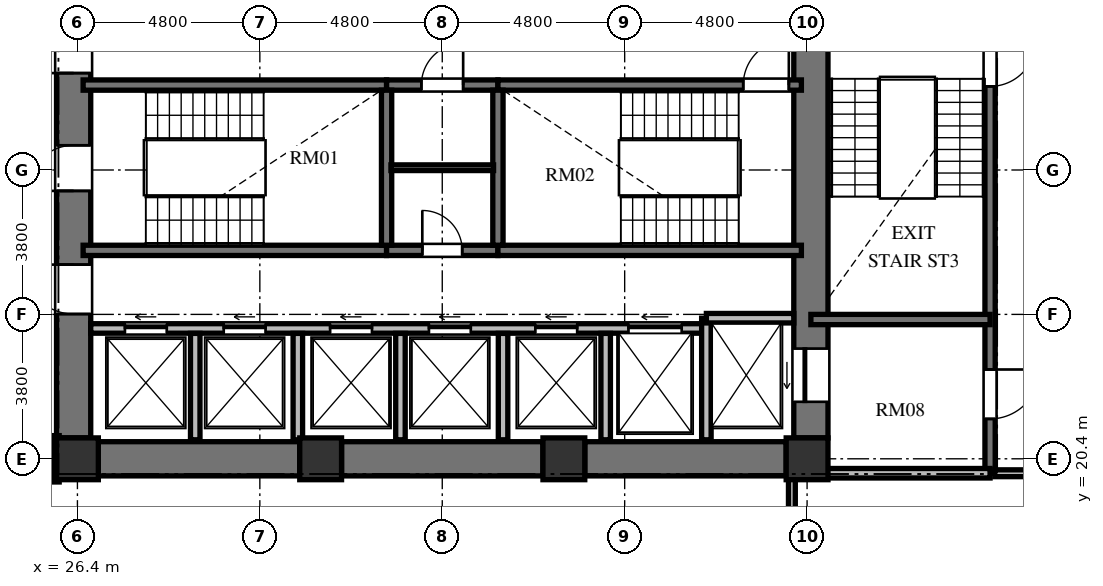
"""IFC4 building model, lengths in metres.
Left out: names, types, materials, properties, quantities, classifications, styles, units other than length and angle.
Written with IfcOpenShell. Run it as: python <this file> out.ifc"""

import sys

from ifc_helpers import new_model, si_unit, direction, frame, frame_2d, origin, origin_2d, place, context, subcontext, project, spatial, rectangle, extrude, element, fill, save


model = new_model("IFC4")
c1 = context("Model", 3, precision=1e-05, world=origin(), true_north=direction((0.0, 1.0)))
c2 = subcontext(c1, "Body", "Model", "MODEL_VIEW")
j1 = project(units=[si_unit("LENGTHUNIT", "METRE"), si_unit("PLANEANGLEUNIT", "RADIAN")], contexts=[c1])
p1 = place(None, origin())
s1 = spatial("IfcSite", under=j1, at=p1, CompositionType="ELEMENT")
p2 = place(p1, origin())
s2 = spatial("IfcBuilding", under=s1, at=p2, CompositionType="ELEMENT")
p3 = place(p2, frame((0.0, 0.0, 54.384)))
s3 = spatial("IfcBuildingStorey", under=s2, at=p3, CompositionType="ELEMENT", Elevation=54.384)
for number, where, z_axis, x_axis in (
    (1, (26.4, 20.4, 0.0), (0.0, 0.0, 1.0), (1.0, 0.0, 0.0)),
    (2, (32.8, 20.4, 0.0), (0.0, 0.0, 1.0), (1.0, 0.0, 0.0)),
    (3, (39.2, 20.4, 0.0), (0.0, 0.0, 1.0), (1.0, 0.0, 0.0)),
    (4, (45.6, 20.4, 0.0), (0.0, 0.0, 1.0), (1.0, 0.0, 0.0)),
):
    element("IfcColumn", number, at=place(p3, frame(where, z_axis=z_axis, x_axis=x_axis)), inside=s3, PredefinedType="COLUMN", context=c2, shape_type="SweptSolid", body=[
        extrude(rectangle(XDim=1.1, YDim=1.1, at=origin_2d()), origin(), (0.0, 0.0, 1.0), 3.648),
    ])
p4 = place(p3, frame((26.3, 20.95, 0.0), z_axis=(0.0, 0.0, 1.0), x_axis=(0.0, 1.0, 0.0)))
e5 = element("IfcWall", 5, at=p4, inside=s3, PredefinedType="SHEAR", context=c2, shape_type="SweptSolid", body=[
    extrude(rectangle(XDim=14.1, YDim=0.9, at=frame_2d((7.05, 0.0))), origin(), (0.0, 0.0, 1.0), 3.648),
])
p5 = place(p4, frame((6.5, 0.0, 0.0)))
e6 = element("IfcOpeningElement", 6, at=p5, cuts=e5, PredefinedType="OPENING", context=c2, shape_type="SweptSolid", body=[
    extrude(rectangle(XDim=1.2, YDim=2.15, at=frame_2d((0.6, 1.075))), frame((0.0, 0.46, 0.0), z_axis=(0.0, -1.0, 0.0), x_axis=(1.0, 0.0, 0.0)), (0.0, 0.0, 1.0), 0.92),
])
p6 = place(p4, frame((9.6, 0.0, 0.0)))
e7 = element("IfcOpeningElement", 7, at=p6, cuts=e5, PredefinedType="OPENING", context=c2, shape_type="SweptSolid", body=[
    extrude(rectangle(XDim=1.3, YDim=2.2, at=frame_2d((0.65, 1.1))), frame((0.0, 0.46, 0.0), z_axis=(0.0, -1.0, 0.0), x_axis=(1.0, 0.0, 0.0)), (0.0, 0.0, 1.0), 0.92),
])
p7 = place(p4, frame((3.26, 0.0, 0.0)))
e8 = element("IfcOpeningElement", 8, at=p7, cuts=e5, PredefinedType="OPENING", context=c2, shape_type="SweptSolid", body=[
    extrude(rectangle(XDim=1.3, YDim=2.2, at=frame_2d((0.65, 1.1))), frame((0.0, 0.46, 0.0), z_axis=(0.0, -1.0, 0.0), x_axis=(1.0, 0.0, 0.0)), (0.0, 0.0, 1.0), 0.92),
])
p8 = place(p3, frame((45.7, 20.95, 0.0), z_axis=(0.0, 0.0, 1.0), x_axis=(0.0, 1.0, 0.0)))
e9 = element("IfcWall", 9, at=p8, inside=s3, PredefinedType="SHEAR", context=c2, shape_type="SweptSolid", body=[
    extrude(rectangle(XDim=14.1, YDim=0.9, at=frame_2d((7.05, 0.0))), origin(), (0.0, 0.0, 1.0), 3.648),
])
p9 = place(p8, frame((11.75, 0.0, 0.0)))
e10 = element("IfcOpeningElement", 10, at=p9, cuts=e9, PredefinedType="OPENING", context=c2, shape_type="SweptSolid", body=[
    extrude(rectangle(XDim=1.4, YDim=2.3, at=frame_2d((0.7, 1.15))), frame((0.0, 0.46, 0.0), z_axis=(0.0, -1.0, 0.0), x_axis=(1.0, 0.0, 0.0)), (0.0, 0.0, 1.0), 0.92),
])
p10 = place(p8, frame((0.95, 0.0, 0.0)))
e11 = element("IfcOpeningElement", 11, at=p10, cuts=e9, PredefinedType="OPENING", context=c2, shape_type="SweptSolid", body=[
    extrude(rectangle(XDim=1.4, YDim=2.3, at=frame_2d((0.7, 1.15))), frame((0.0, 0.46, 0.0), z_axis=(0.0, -1.0, 0.0), x_axis=(1.0, 0.0, 0.0)), (0.0, 0.0, 1.0), 0.92),
])
p11 = place(p3, frame((26.95, 20.4, 0.0), z_axis=(0.0, 0.0, 1.0), x_axis=(1.0, 0.0, 0.0)))
e12 = element("IfcWall", 12, at=p11, inside=s3, PredefinedType="SHEAR", context=c2, shape_type="SweptSolid", body=[
    extrude(rectangle(XDim=5.3, YDim=0.9, at=frame_2d((2.65, 0.0))), origin(), (0.0, 0.0, 1.0), 3.648),
])
p12 = place(p3, frame((33.35, 20.4, 0.0), z_axis=(0.0, 0.0, 1.0), x_axis=(1.0, 0.0, 0.0)))
e13 = element("IfcWall", 13, at=p12, inside=s3, PredefinedType="SHEAR", context=c2, shape_type="SweptSolid", body=[
    extrude(rectangle(XDim=5.3, YDim=0.9, at=frame_2d((2.65, 0.0))), origin(), (0.0, 0.0, 1.0), 3.648),
])
p13 = place(p3, frame((39.75, 20.4, 0.0), z_axis=(0.0, 0.0, 1.0), x_axis=(1.0, 0.0, 0.0)))
e14 = element("IfcWall", 14, at=p13, inside=s3, PredefinedType="SHEAR", context=c2, shape_type="SweptSolid", body=[
    extrude(rectangle(XDim=5.3, YDim=0.9, at=frame_2d((2.65, 0.0))), origin(), (0.0, 0.0, 1.0), 3.648),
])
p14 = place(p3, frame((26.55, 30.235, 0.0), z_axis=(0.0, 0.0, 1.0), x_axis=(1.0, 0.0, 0.0)))
e15 = element("IfcWall", 15, at=p14, inside=s3, PredefinedType="SHEAR", context=c2, shape_type="SweptSolid", body=[
    extrude(rectangle(XDim=7.985, YDim=0.27, at=frame_2d((3.992, 0.0))), origin(), (0.0, 0.0, 1.0), 3.648),
])
p15 = place(p3, frame((34.535, 30.235, 0.0), z_axis=(0.0, 0.0, 1.0), x_axis=(1.0, 0.0, 0.0)))
e16 = element("IfcWall", 16, at=p15, inside=s3, PredefinedType="SHEAR", context=c2, shape_type="SweptSolid", body=[
    extrude(rectangle(XDim=2.93, YDim=0.27, at=frame_2d((1.465, 0.0))), origin(), (0.0, 0.0, 1.0), 3.648),
])
p16 = place(p15, frame((0.915, 0.0, 0.0)))
e17 = element("IfcOpeningElement", 17, at=p16, cuts=e16, PredefinedType="OPENING", context=c2, shape_type="SweptSolid", body=[
    extrude(rectangle(XDim=1.1, YDim=2.15, at=frame_2d((0.55, 1.075))), frame((0.0, 0.145, 0.0), z_axis=(0.0, -1.0, 0.0), x_axis=(1.0, 0.0, 0.0)), (0.0, 0.0, 1.0), 0.29),
])
p17 = place(p3, frame((37.465, 30.235, 0.0), z_axis=(0.0, 0.0, 1.0), x_axis=(1.0, 0.0, 0.0)))
e18 = element("IfcWall", 18, at=p17, inside=s3, PredefinedType="SHEAR", context=c2, shape_type="SweptSolid", body=[
    extrude(rectangle(XDim=7.985, YDim=0.27, at=frame_2d((3.992, 0.0))), origin(), (0.0, 0.0, 1.0), 3.648),
])
p18 = place(p17, frame((6.455, 0.0, 0.0)))
e19 = element("IfcOpeningElement", 19, at=p18, cuts=e18, PredefinedType="OPENING", context=c2, shape_type="SweptSolid", body=[
    extrude(rectangle(XDim=1.2, YDim=2.15, at=frame_2d((0.6, 1.075))), frame((0.0, 0.145, 0.0), z_axis=(0.0, -1.0, 0.0), x_axis=(1.0, 0.0, 0.0)), (0.0, 0.0, 1.0), 0.29),
])
p19 = place(p3, frame((26.55, 25.885, 0.0), z_axis=(0.0, 0.0, 1.0), x_axis=(1.0, 0.0, 0.0)))
e20 = element("IfcWall", 20, at=p19, inside=s3, PredefinedType="SHEAR", context=c2, shape_type="SweptSolid", body=[
    extrude(rectangle(XDim=7.985, YDim=0.27, at=frame_2d((3.992, 0.0))), origin(), (0.0, 0.0, 1.0), 3.648),
])
p20 = place(p3, frame((34.535, 25.885, 0.0), z_axis=(0.0, 0.0, 1.0), x_axis=(1.0, 0.0, 0.0)))
e21 = element("IfcWall", 21, at=p20, inside=s3, PredefinedType="SHEAR", context=c2, shape_type="SweptSolid", body=[
    extrude(rectangle(XDim=2.93, YDim=0.27, at=frame_2d((1.465, 0.0))), origin(), (0.0, 0.0, 1.0), 3.648),
])
p21 = place(p20, frame((0.94, 0.0, 0.0)))
e22 = element("IfcOpeningElement", 22, at=p21, cuts=e21, PredefinedType="OPENING", context=c2, shape_type="SweptSolid", body=[
    extrude(rectangle(XDim=1.05, YDim=2.15, at=frame_2d((0.525, 1.075))), frame((0.0, 0.145, 0.0), z_axis=(0.0, -1.0, 0.0), x_axis=(1.0, 0.0, 0.0)), (0.0, 0.0, 1.0), 0.29),
])
p22 = place(p3, frame((37.465, 25.885, 0.0), z_axis=(0.0, 0.0, 1.0), x_axis=(1.0, 0.0, 0.0)))
e23 = element("IfcWall", 23, at=p22, inside=s3, PredefinedType="SHEAR", context=c2, shape_type="SweptSolid", body=[
    extrude(rectangle(XDim=7.985, YDim=0.27, at=frame_2d((3.992, 0.0))), origin(), (0.0, 0.0, 1.0), 3.648),
])
for number, where, z_axis, x_axis in (
    (24, (34.535, 26.02, 0.0), (0.0, 0.0, 1.0), (0.0, 1.0, 0.0)),
    (25, (37.465, 26.02, 0.0), (0.0, 0.0, 1.0), (0.0, 1.0, 0.0)),
):
    element("IfcWall", number, at=place(p3, frame(where, z_axis=z_axis, x_axis=x_axis)), inside=s3, PredefinedType="SHEAR", context=c2, shape_type="SweptSolid", body=[
        extrude(rectangle(XDim=4.08, YDim=0.27, at=frame_2d((2.04, 0.0))), origin(), (0.0, 0.0, 1.0), 3.648),
    ])
p23 = place(p3, frame((34.65, 28.06, 0.0), z_axis=(0.0, 0.0, 1.0), x_axis=(1.0, 0.0, 0.0)))
e26 = element("IfcWall", 26, at=p23, inside=s3, PredefinedType="PARTITIONING", context=c2, shape_type="SweptSolid", body=[
    extrude(rectangle(XDim=2.7, YDim=0.15, at=frame_2d((1.35, 0.0))), origin(), (0.0, 0.0, 1.0), 3.428),
])
p24 = place(p3, frame((26.75, 23.83, 0.0), z_axis=(0.0, 0.0, 1.0), x_axis=(1.0, 0.0, 0.0)))
e27 = element("IfcWall", 27, at=p24, inside=s3, PredefinedType="SOLIDWALL", context=c2, shape_type="SweptSolid", body=[
    extrude(rectangle(XDim=16.2, YDim=0.25, at=frame_2d((8.1, 0.0))), origin(), (0.0, 0.0, 1.0), 3.428),
])
p25 = place(p24, frame((0.9, 0.0, 0.0)))
e28 = element("IfcOpeningElement", 28, at=p25, cuts=e27, PredefinedType="OPENING", context=c2, shape_type="SweptSolid", body=[
    extrude(rectangle(XDim=1.1, YDim=2.2, at=frame_2d((0.55, 1.1))), frame((0.0, 0.135, 0.0), z_axis=(0.0, -1.0, 0.0), x_axis=(1.0, 0.0, 0.0)), (0.0, 0.0, 1.0), 0.27),
])
p26 = place(p24, frame((3.5, 0.0, 0.0)))
e29 = element("IfcOpeningElement", 29, at=p26, cuts=e27, PredefinedType="OPENING", context=c2, shape_type="SweptSolid", body=[
    extrude(rectangle(XDim=1.1, YDim=2.2, at=frame_2d((0.55, 1.1))), frame((0.0, 0.135, 0.0), z_axis=(0.0, -1.0, 0.0), x_axis=(1.0, 0.0, 0.0)), (0.0, 0.0, 1.0), 0.27),
])
p27 = place(p24, frame((6.3, 0.0, 0.0)))
e30 = element("IfcOpeningElement", 30, at=p27, cuts=e27, PredefinedType="OPENING", context=c2, shape_type="SweptSolid", body=[
    extrude(rectangle(XDim=1.1, YDim=2.2, at=frame_2d((0.55, 1.1))), frame((0.0, 0.135, 0.0), z_axis=(0.0, -1.0, 0.0), x_axis=(1.0, 0.0, 0.0)), (0.0, 0.0, 1.0), 0.27),
])
p28 = place(p24, frame((8.9, 0.0, 0.0)))
e31 = element("IfcOpeningElement", 31, at=p28, cuts=e27, PredefinedType="OPENING", context=c2, shape_type="SweptSolid", body=[
    extrude(rectangle(XDim=1.1, YDim=2.2, at=frame_2d((0.55, 1.1))), frame((0.0, 0.135, 0.0), z_axis=(0.0, -1.0, 0.0), x_axis=(1.0, 0.0, 0.0)), (0.0, 0.0, 1.0), 0.27),
])
p29 = place(p24, frame((11.7, 0.0, 0.0)))
e32 = element("IfcOpeningElement", 32, at=p29, cuts=e27, PredefinedType="OPENING", context=c2, shape_type="SweptSolid", body=[
    extrude(rectangle(XDim=1.1, YDim=2.2, at=frame_2d((0.55, 1.1))), frame((0.0, 0.135, 0.0), z_axis=(0.0, -1.0, 0.0), x_axis=(1.0, 0.0, 0.0)), (0.0, 0.0, 1.0), 0.27),
])
p30 = place(p24, frame((14.15, 0.0, 0.0)))
e33 = element("IfcOpeningElement", 33, at=p30, cuts=e27, PredefinedType="OPENING", context=c2, shape_type="SweptSolid", body=[
    extrude(rectangle(XDim=1.4, YDim=2.3, at=frame_2d((0.7, 1.15))), frame((0.0, 0.135, 0.0), z_axis=(0.0, -1.0, 0.0), x_axis=(1.0, 0.0, 0.0)), (0.0, 0.0, 1.0), 0.27),
])
p31 = place(p3, frame((42.95, 20.9, 0.0), z_axis=(0.0, 0.0, 1.0), x_axis=(0.0, 1.0, 0.0)))
e34 = element("IfcWall", 34, at=p31, inside=s3, PredefinedType="SOLIDWALL", context=c2, shape_type="SweptSolid", body=[
    extrude(rectangle(XDim=3.2, YDim=0.25, at=frame_2d((1.6, 0.0))), origin(), (0.0, 0.0, 1.0), 3.428),
])
p32 = place(p3, frame((42.95, 24.1, 0.0), z_axis=(0.0, 0.0, 1.0), x_axis=(1.0, 0.0, 0.0)))
e35 = element("IfcWall", 35, at=p32, inside=s3, PredefinedType="SOLIDWALL", context=c2, shape_type="SweptSolid", body=[
    extrude(rectangle(XDim=2.3, YDim=0.25, at=frame_2d((1.15, 0.0))), origin(), (0.0, 0.0, 1.0), 3.428),
])
for number, where, z_axis, x_axis in (
    (36, (29.5, 20.9, 0.0), (0.0, 0.0, 1.0), (0.0, 1.0, 0.0)),
    (37, (32.2, 20.9, 0.0), (0.0, 0.0, 1.0), (0.0, 1.0, 0.0)),
    (38, (34.9, 20.9, 0.0), (0.0, 0.0, 1.0), (0.0, 1.0, 0.0)),
    (39, (37.6, 20.9, 0.0), (0.0, 0.0, 1.0), (0.0, 1.0, 0.0)),
    (40, (40.3, 20.9, 0.0), (0.0, 0.0, 1.0), (0.0, 1.0, 0.0)),
):
    element("IfcWall", number, at=place(p3, frame(where, z_axis=z_axis, x_axis=x_axis)), inside=s3, PredefinedType="SOLIDWALL", context=c2, shape_type="SweptSolid", body=[
        extrude(rectangle(XDim=2.8, YDim=0.25, at=frame_2d((1.4, 0.0))), origin(), (0.0, 0.0, 1.0), 3.428),
    ])
p33 = place(p3, frame((50.415, 35.845, 0.0), z_axis=(0.0, 0.0, 1.0), x_axis=(0.0, -1.0, 0.0)))
e41 = element("IfcWall", 41, at=p33, inside=s3, PredefinedType="SHEAR", context=c2, shape_type="SweptSolid", body=[
    extrude(rectangle(XDim=15.825, YDim=0.27, at=frame_2d((7.913, 0.0))), origin(), (0.0, 0.0, 1.0), 3.648),
])
p34 = place(p33, frame((4.445, 0.0, 0.0)))
e42 = element("IfcOpeningElement", 42, at=p34, cuts=e41, PredefinedType="OPENING", context=c2, shape_type="SweptSolid", body=[
    extrude(rectangle(XDim=1.2, YDim=2.15, at=frame_2d((0.6, 1.075))), frame((0.0, 0.145, 0.0), z_axis=(0.0, -1.0, 0.0), x_axis=(1.0, 0.0, 0.0)), (0.0, 0.0, 1.0), 0.29),
])
p35 = place(p33, frame((1.295, 0.0, 0.0)))
e43 = element("IfcOpeningElement", 43, at=p35, cuts=e41, PredefinedType="OPENING", context=c2, shape_type="SweptSolid", body=[
    extrude(rectangle(XDim=1.3, YDim=2.2, at=frame_2d((0.65, 1.1))), frame((0.0, 0.145, 0.0), z_axis=(0.0, -1.0, 0.0), x_axis=(1.0, 0.0, 0.0)), (0.0, 0.0, 1.0), 0.29),
])
p36 = place(p33, frame((13.095, 0.0, 0.0)))
e44 = element("IfcOpeningElement", 44, at=p36, cuts=e41, PredefinedType="OPENING", context=c2, shape_type="SweptSolid", body=[
    extrude(rectangle(XDim=1.3, YDim=2.2, at=frame_2d((0.65, 1.1))), frame((0.0, 0.145, 0.0), z_axis=(0.0, -1.0, 0.0), x_axis=(1.0, 0.0, 0.0)), (0.0, 0.0, 1.0), 0.29),
])
p37 = place(p3, frame((45.7, 24.065, 0.0), z_axis=(0.0, 0.0, 1.0), x_axis=(1.0, 0.0, 0.0)))
e45 = element("IfcWall", 45, at=p37, inside=s3, PredefinedType="SHEAR", context=c2, shape_type="SweptSolid", body=[
    extrude(rectangle(XDim=4.715, YDim=0.27, at=frame_2d((2.357, 0.0))), origin(), (0.0, 0.0, 1.0), 3.648),
])
p38 = place(p3, frame((45.7, 20.02, 0.0), z_axis=(0.0, 0.0, 1.0), x_axis=(1.0, 0.0, 0.0)))
e46 = element("IfcWall", 46, at=p38, inside=s3, PredefinedType="SOLIDWALL", context=c2, shape_type="SweptSolid", body=[
    extrude(rectangle(XDim=4.715, YDim=0.25, at=frame_2d((2.357, 0.0))), origin(), (0.0, 0.0, 1.0), 2.813),
])
p39 = place(p3, frame((53.19, 20.02, 0.0), z_axis=(0.0, 0.0, 1.0), x_axis=(-1.0, 0.0, 0.0)))
e47 = element("IfcWall", 47, at=p39, inside=s3, PredefinedType="PARTITIONING", context=c2, shape_type="SweptSolid", body=[
    extrude(rectangle(XDim=2.65, YDim=0.18, at=frame_2d((1.325, 0.0))), origin(), (0.0, 0.0, 1.0), 2.813),
])
p40 = place(p3, frame((25.83, 21.01, 0.0), z_axis=(0.0, 0.0, 1.0), x_axis=(0.0, -1.0, 0.0)))
e48 = element("IfcWall", 48, at=p40, inside=s3, PredefinedType="PARTITIONING", context=c2, shape_type="SweptSolid", body=[
    extrude(rectangle(XDim=1.22, YDim=0.18, at=frame_2d((0.61, 0.0))), origin(), (0.0, 0.0, 1.0), 3.428),
])
p41 = place(p3, frame((45.2, 19.91, 0.0), z_axis=(0.0, 0.0, 1.0), x_axis=(0.0, -1.0, 0.0)))
e49 = element("IfcWall", 49, at=p41, inside=s3, PredefinedType="PARTITIONING", context=c2, shape_type="SweptSolid", body=[
    extrude(rectangle(XDim=2.55, YDim=0.18, at=frame_2d((1.275, 0.0))), origin(), (0.0, 0.0, 1.0), 3.428),
])
p42 = place(p5, origin())
e50 = element("IfcDoor", 50, at=p42, inside=s3, OperationType="SINGLE_SWING_LEFT", PredefinedType="DOOR", context=c2, shape_type="SweptSolid", body=[
    extrude(rectangle(XDim=1.2, YDim=2.15, at=frame_2d((0.6, 1.075))), frame((0.0, 0.025, 0.0), z_axis=(0.0, -1.0, 0.0), x_axis=(1.0, 0.0, 0.0)), (0.0, 0.0, 1.0), 0.05),
])
fill(e6, e50)
p43 = place(p18, origin())
e51 = element("IfcDoor", 51, at=p43, inside=s3, OperationType="SINGLE_SWING_RIGHT", PredefinedType="DOOR", context=c2, shape_type="SweptSolid", body=[
    extrude(rectangle(XDim=1.2, YDim=2.15, at=frame_2d((0.6, 1.075))), frame((0.0, 0.025, 0.0), z_axis=(0.0, -1.0, 0.0), x_axis=(1.0, 0.0, 0.0)), (0.0, 0.0, 1.0), 0.05),
])
fill(e19, e51)
p44 = place(p21, origin())
e52 = element("IfcDoor", 52, at=p44, inside=s3, OperationType="SINGLE_SWING_LEFT", PredefinedType="DOOR", context=c2, shape_type="SweptSolid", body=[
    extrude(rectangle(XDim=1.05, YDim=2.15, at=frame_2d((0.525, 1.075))), frame((0.0, 0.025, 0.0), z_axis=(0.0, -1.0, 0.0), x_axis=(1.0, 0.0, 0.0)), (0.0, 0.0, 1.0), 0.05),
])
fill(e22, e52)
p45 = place(p16, origin())
e53 = element("IfcDoor", 53, at=p45, inside=s3, OperationType="SINGLE_SWING_RIGHT", PredefinedType="DOOR", context=c2, shape_type="SweptSolid", body=[
    extrude(rectangle(XDim=1.1, YDim=2.15, at=frame_2d((0.55, 1.075))), frame((0.0, 0.025, 0.0), z_axis=(0.0, -1.0, 0.0), x_axis=(1.0, 0.0, 0.0)), (0.0, 0.0, 1.0), 0.05),
])
fill(e17, e53)
p46 = place(p6, origin())
e54 = element("IfcDoor", 54, at=p46, inside=s3, OperationType="SINGLE_SWING_LEFT", PredefinedType="DOOR", context=c2, shape_type="SweptSolid", body=[
    extrude(rectangle(XDim=1.3, YDim=2.2, at=frame_2d((0.65, 1.1))), frame((0.0, 0.025, 0.0), z_axis=(0.0, -1.0, 0.0), x_axis=(1.0, 0.0, 0.0)), (0.0, 0.0, 1.0), 0.05),
])
fill(e7, e54)
p47 = place(p7, origin())
e55 = element("IfcDoor", 55, at=p47, inside=s3, OperationType="SINGLE_SWING_RIGHT", PredefinedType="DOOR", context=c2, shape_type="SweptSolid", body=[
    extrude(rectangle(XDim=1.3, YDim=2.2, at=frame_2d((0.65, 1.1))), frame((0.0, 0.025, 0.0), z_axis=(0.0, -1.0, 0.0), x_axis=(1.0, 0.0, 0.0)), (0.0, 0.0, 1.0), 0.05),
])
fill(e8, e55)
p48 = place(p25, origin())
e56 = element("IfcDoor", 56, at=p48, inside=s3, OperationType="SLIDING_TO_LEFT", PredefinedType="DOOR", context=c2, shape_type="SweptSolid", body=[
    extrude(rectangle(XDim=1.1, YDim=2.2, at=frame_2d((0.55, 1.1))), frame((0.0, 0.025, 0.0), z_axis=(0.0, -1.0, 0.0), x_axis=(1.0, 0.0, 0.0)), (0.0, 0.0, 1.0), 0.05),
])
fill(e28, e56)
p49 = place(p26, origin())
e57 = element("IfcDoor", 57, at=p49, inside=s3, OperationType="SLIDING_TO_LEFT", PredefinedType="DOOR", context=c2, shape_type="SweptSolid", body=[
    extrude(rectangle(XDim=1.1, YDim=2.2, at=frame_2d((0.55, 1.1))), frame((0.0, 0.025, 0.0), z_axis=(0.0, -1.0, 0.0), x_axis=(1.0, 0.0, 0.0)), (0.0, 0.0, 1.0), 0.05),
])
fill(e29, e57)
p50 = place(p27, origin())
e58 = element("IfcDoor", 58, at=p50, inside=s3, OperationType="SLIDING_TO_LEFT", PredefinedType="DOOR", context=c2, shape_type="SweptSolid", body=[
    extrude(rectangle(XDim=1.1, YDim=2.2, at=frame_2d((0.55, 1.1))), frame((0.0, 0.025, 0.0), z_axis=(0.0, -1.0, 0.0), x_axis=(1.0, 0.0, 0.0)), (0.0, 0.0, 1.0), 0.05),
])
fill(e30, e58)
p51 = place(p28, origin())
e59 = element("IfcDoor", 59, at=p51, inside=s3, OperationType="SLIDING_TO_LEFT", PredefinedType="DOOR", context=c2, shape_type="SweptSolid", body=[
    extrude(rectangle(XDim=1.1, YDim=2.2, at=frame_2d((0.55, 1.1))), frame((0.0, 0.025, 0.0), z_axis=(0.0, -1.0, 0.0), x_axis=(1.0, 0.0, 0.0)), (0.0, 0.0, 1.0), 0.05),
])
fill(e31, e59)
p52 = place(p29, origin())
e60 = element("IfcDoor", 60, at=p52, inside=s3, OperationType="SLIDING_TO_LEFT", PredefinedType="DOOR", context=c2, shape_type="SweptSolid", body=[
    extrude(rectangle(XDim=1.1, YDim=2.2, at=frame_2d((0.55, 1.1))), frame((0.0, 0.025, 0.0), z_axis=(0.0, -1.0, 0.0), x_axis=(1.0, 0.0, 0.0)), (0.0, 0.0, 1.0), 0.05),
])
fill(e32, e60)
p53 = place(p10, origin())
e61 = element("IfcDoor", 61, at=p53, inside=s3, OperationType="SLIDING_TO_LEFT", PredefinedType="DOOR", context=c2, shape_type="SweptSolid", body=[
    extrude(rectangle(XDim=1.4, YDim=2.3, at=frame_2d((0.7, 1.15))), frame((0.0, 0.025, 0.0), z_axis=(0.0, -1.0, 0.0), x_axis=(1.0, 0.0, 0.0)), (0.0, 0.0, 1.0), 0.05),
])
fill(e11, e61)
p54 = place(p30, origin())
e62 = element("IfcDoor", 62, at=p54, inside=s3, OperationType="SLIDING_TO_LEFT", PredefinedType="DOOR", context=c2, shape_type="SweptSolid", body=[
    extrude(rectangle(XDim=1.4, YDim=2.3, at=frame_2d((0.7, 1.15))), frame((0.0, 0.025, 0.0), z_axis=(0.0, -1.0, 0.0), x_axis=(1.0, 0.0, 0.0)), (0.0, 0.0, 1.0), 0.05),
])
fill(e33, e62)
p55 = place(p34, origin())
e63 = element("IfcDoor", 63, at=p55, inside=s3, OperationType="SINGLE_SWING_LEFT", PredefinedType="DOOR", context=c2, shape_type="SweptSolid", body=[
    extrude(rectangle(XDim=1.2, YDim=2.15, at=frame_2d((0.6, 1.075))), frame((0.0, 0.025, 0.0), z_axis=(0.0, -1.0, 0.0), x_axis=(1.0, 0.0, 0.0)), (0.0, 0.0, 1.0), 0.05),
])
fill(e42, e63)
p56 = place(p36, origin())
e64 = element("IfcDoor", 64, at=p56, inside=s3, OperationType="SINGLE_SWING_LEFT", PredefinedType="DOOR", context=c2, shape_type="SweptSolid", body=[
    extrude(rectangle(XDim=1.3, YDim=2.2, at=frame_2d((0.65, 1.1))), frame((0.0, 0.025, 0.0), z_axis=(0.0, -1.0, 0.0), x_axis=(1.0, 0.0, 0.0)), (0.0, 0.0, 1.0), 0.05),
])
fill(e44, e64)
save(model, sys.argv[1])
